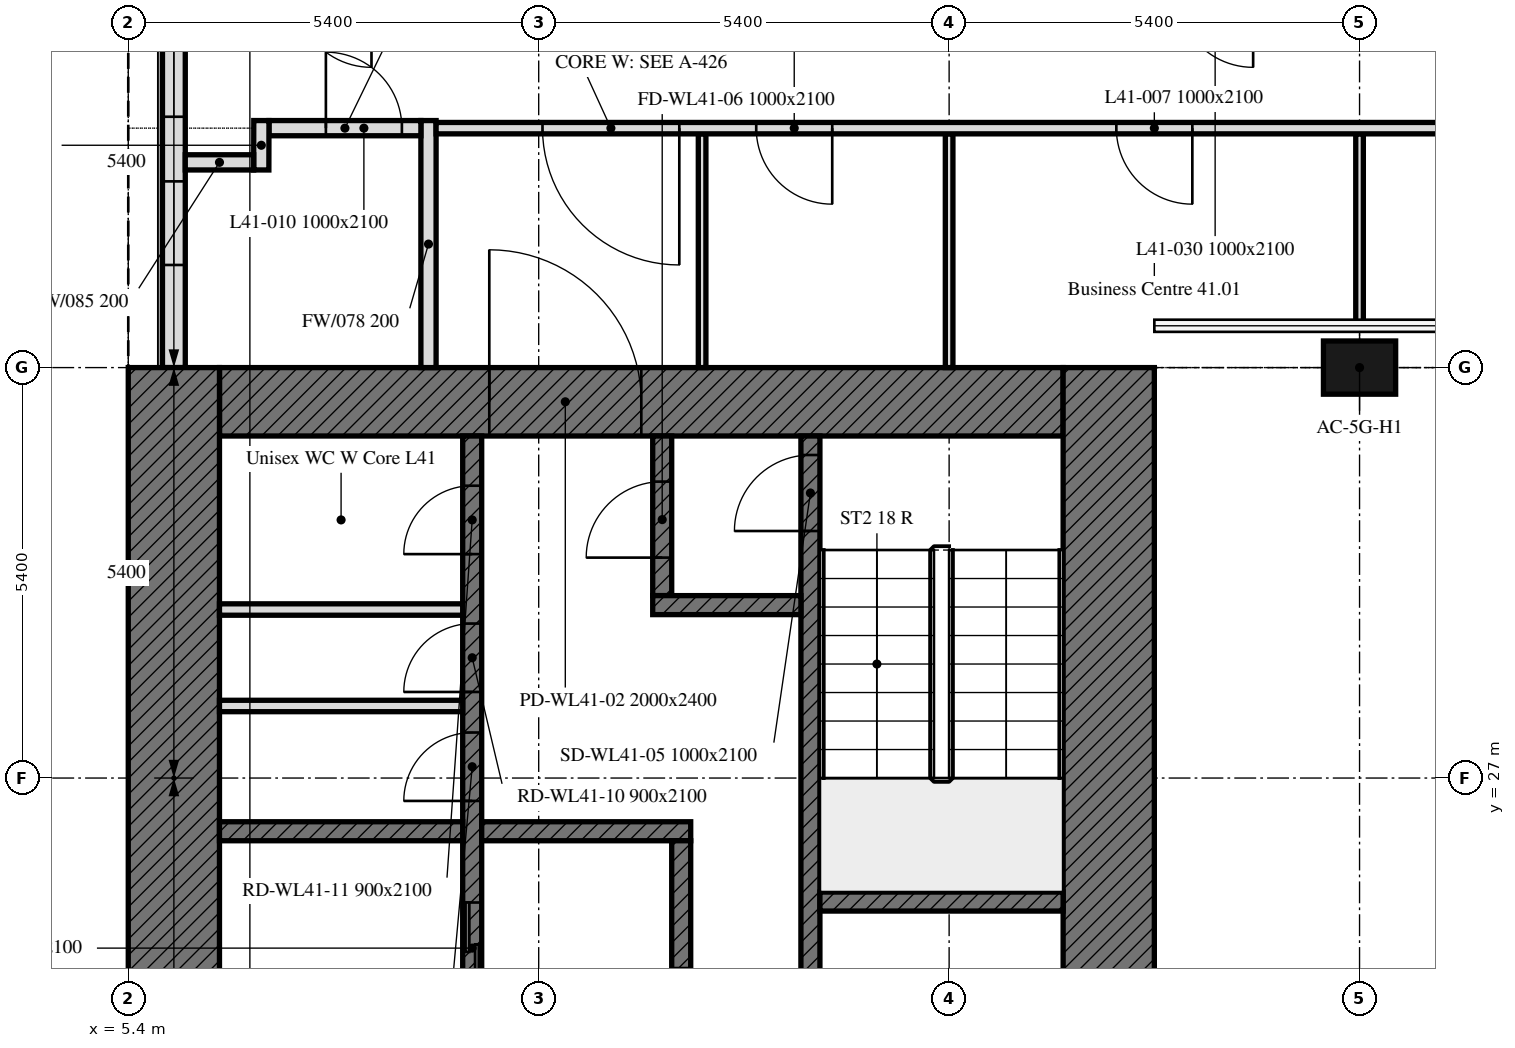
"""IFC4 building model, lengths in metres.
Left out: names, types, materials, properties, quantities, classifications, styles, units other than length and angle.
Written with IfcOpenShell. Run it as: python <this file> out.ifc"""

import sys

from ifc_helpers import new_model, si_unit, direction, frame, frame_2d, origin, origin_2d, place, context, subcontext, project, spatial, rectangle, extrude, element, fill, save


model = new_model("IFC4")
c1 = context("Model", 3, precision=1e-05, world=origin(), true_north=direction((0.0, 1.0)))
c2 = subcontext(c1, "Body", "Model", "MODEL_VIEW")
j1 = project(units=[si_unit("LENGTHUNIT", "METRE"), si_unit("PLANEANGLEUNIT", "RADIAN")], contexts=[c1])
p1 = place(None, origin())
s1 = spatial("IfcSite", under=j1, at=p1, CompositionType="ELEMENT")
p2 = place(p1, origin())
s2 = spatial("IfcBuilding", under=s1, at=p2, CompositionType="ELEMENT")
p3 = place(p2, frame((0.0, 0.0, 172.6)))
s3 = spatial("IfcBuildingStorey", under=s2, at=p3, CompositionType="ELEMENT", Elevation=172.6)
p4 = place(p3, frame((21.6, 32.4, 0.0), z_axis=(0.0, 0.0, 1.0), x_axis=(1.0, 0.0, 0.0)))
e1 = element("IfcColumn", 1, at=p4, inside=s3, PredefinedType="COLUMN", context=c2, shape_type="SweptSolid", body=[
    extrude(rectangle(XDim=0.95, YDim=0.7, at=origin_2d()), origin(), (0.0, 0.0, 1.0), 2.8),
])
p5 = place(p3, frame((6.0, 37.614, 0.0), z_axis=(0.0, 0.0, 1.0), x_axis=(0.0, -1.0, 0.0)))
e2 = element("IfcWall", 2, at=p5, inside=s3, PredefinedType="SOLIDWALL", context=c2, shape_type="SweptSolid", body=[
    extrude(rectangle(XDim=5.214, YDim=0.3, at=frame_2d((2.607, 0.0))), origin(), (0.0, 0.0, 1.0), 2.8),
])
p6 = place(p5, frame((0.814, 0.0, 0.9)))
e3 = element("IfcOpeningElement", 3, at=p6, cuts=e2, PredefinedType="OPENING", context=c2, shape_type="SweptSolid", body=[
    extrude(rectangle(XDim=1.1, YDim=1.7, at=frame_2d((0.55, 0.85))), frame((0.0, 0.16, 0.0), z_axis=(0.0, -1.0, 0.0), x_axis=(1.0, 0.0, 0.0)), (0.0, 0.0, 1.0), 0.32),
])
p7 = place(p5, frame((2.764, 0.0, 0.9)))
e4 = element("IfcOpeningElement", 4, at=p7, cuts=e2, PredefinedType="OPENING", context=c2, shape_type="SweptSolid", body=[
    extrude(rectangle(XDim=1.1, YDim=1.7, at=frame_2d((0.55, 0.85))), frame((0.0, 0.16, 0.0), z_axis=(0.0, -1.0, 0.0), x_axis=(1.0, 0.0, 0.0)), (0.0, 0.0, 1.0), 0.32),
])
p8 = place(p3, frame((6.6, 31.95, 0.0), z_axis=(0.0, 0.0, 1.0), x_axis=(1.0, 0.0, 0.0)))
e5 = element("IfcWall", 5, at=p8, inside=s3, PredefinedType="SOLIDWALL", context=c2, shape_type="SweptSolid", body=[
    extrude(rectangle(XDim=11.1, YDim=0.9, at=frame_2d((5.55, 0.0))), origin(), (0.0, 0.0, 1.0), 2.8),
])
p9 = place(p8, frame((3.55, 0.0, 0.0)))
e6 = element("IfcOpeningElement", 6, at=p9, cuts=e5, PredefinedType="OPENING", context=c2, shape_type="SweptSolid", body=[
    extrude(rectangle(XDim=2.0, YDim=2.4, at=frame_2d((1.0, 1.2))), frame((0.0, 0.45, 0.0), z_axis=(0.0, -1.0, 0.0), x_axis=(1.0, 0.0, 0.0)), (0.0, 0.0, 1.0), 0.9),
])
for number, where, z_axis, x_axis in (
    (7, (6.0, 16.2, 0.0), (0.0, 0.0, 1.0), (0.0, 1.0, 0.0)),
    (8, (18.3, 32.4, 0.0), (0.0, 0.0, 1.0), (0.0, -1.0, 0.0)),
):
    element("IfcWall", number, at=place(p3, frame(where, z_axis=z_axis, x_axis=x_axis)), inside=s3, PredefinedType="SOLIDWALL", context=c2, shape_type="SweptSolid", body=[
        extrude(rectangle(XDim=16.2, YDim=1.2, at=frame_2d((8.1, 0.0))), origin(), (0.0, 0.0, 1.0), 2.8),
    ])
p10 = place(p3, frame((9.925, 17.1, 0.0), z_axis=(0.0, 0.0, 1.0), x_axis=(0.0, 1.0, 0.0)))
e9 = element("IfcWall", 9, at=p10, inside=s3, PredefinedType="SOLIDWALL", context=c2, shape_type="SweptSolid", body=[
    extrude(rectangle(XDim=14.4, YDim=0.25, at=frame_2d((7.2, 0.0))), origin(), (0.0, 0.0, 1.0), 2.8),
])
p11 = place(p10, frame((4.6, 0.0, 0.0)))
e10 = element("IfcOpeningElement", 10, at=p11, cuts=e9, PredefinedType="OPENING", context=c2, shape_type="SweptSolid", body=[
    extrude(rectangle(XDim=1.0, YDim=2.1, at=frame_2d((0.5, 1.05))), frame((0.0, 0.125, 0.0), z_axis=(0.0, -1.0, 0.0), x_axis=(1.0, 0.0, 0.0)), (0.0, 0.0, 1.0), 0.25),
])
p12 = place(p10, frame((7.062, 0.0, 0.0)))
e11 = element("IfcOpeningElement", 11, at=p12, cuts=e9, PredefinedType="OPENING", context=c2, shape_type="SweptSolid", body=[
    extrude(rectangle(XDim=1.2, YDim=2.1, at=frame_2d((0.6, 1.05))), frame((0.0, 0.125, 0.0), z_axis=(0.0, -1.0, 0.0), x_axis=(1.0, 0.0, 0.0)), (0.0, 0.0, 1.0), 0.25),
])
p13 = place(p10, frame((9.599, 0.0, 0.0)))
e12 = element("IfcOpeningElement", 12, at=p13, cuts=e9, PredefinedType="OPENING", context=c2, shape_type="SweptSolid", body=[
    extrude(rectangle(XDim=0.9, YDim=2.1, at=frame_2d((0.45, 1.05))), frame((0.0, 0.125, 0.0), z_axis=(0.0, -1.0, 0.0), x_axis=(1.0, 0.0, 0.0)), (0.0, 0.0, 1.0), 0.25),
])
p14 = place(p10, frame((11.032, 0.0, 0.0)))
e13 = element("IfcOpeningElement", 13, at=p14, cuts=e9, PredefinedType="OPENING", context=c2, shape_type="SweptSolid", body=[
    extrude(rectangle(XDim=0.9, YDim=2.1, at=frame_2d((0.45, 1.05))), frame((0.0, 0.125, 0.0), z_axis=(0.0, -1.0, 0.0), x_axis=(1.0, 0.0, 0.0)), (0.0, 0.0, 1.0), 0.25),
])
p15 = place(p10, frame((12.846, 0.0, 0.0)))
e14 = element("IfcOpeningElement", 14, at=p15, cuts=e9, PredefinedType="OPENING", context=c2, shape_type="SweptSolid", body=[
    extrude(rectangle(XDim=0.9, YDim=2.1, at=frame_2d((0.45, 1.05))), frame((0.0, 0.125, 0.0), z_axis=(0.0, -1.0, 0.0), x_axis=(1.0, 0.0, 0.0)), (0.0, 0.0, 1.0), 0.25),
])
p16 = place(p3, frame((14.375, 17.1, 0.0), z_axis=(0.0, 0.0, 1.0), x_axis=(0.0, 1.0, 0.0)))
e15 = element("IfcWall", 15, at=p16, inside=s3, PredefinedType="SOLIDWALL", context=c2, shape_type="SweptSolid", body=[
    extrude(rectangle(XDim=14.4, YDim=0.25, at=frame_2d((7.2, 0.0))), origin(), (0.0, 0.0, 1.0), 2.8),
])
p17 = place(p16, frame((13.15, 0.0, 0.0)))
e16 = element("IfcOpeningElement", 16, at=p17, cuts=e15, PredefinedType="OPENING", context=c2, shape_type="SweptSolid", body=[
    extrude(rectangle(XDim=1.0, YDim=2.1, at=frame_2d((0.5, 1.05))), frame((0.0, 0.125, 0.0), z_axis=(0.0, -1.0, 0.0), x_axis=(1.0, 0.0, 0.0)), (0.0, 0.0, 1.0), 0.25),
])
p18 = place(p16, frame((0.6, 0.0, 0.0)))
e17 = element("IfcOpeningElement", 17, at=p18, cuts=e15, PredefinedType="OPENING", context=c2, shape_type="SweptSolid", body=[
    extrude(rectangle(XDim=1.1, YDim=2.1, at=frame_2d((0.55, 1.05))), frame((0.0, 0.125, 0.0), z_axis=(0.0, -1.0, 0.0), x_axis=(1.0, 0.0, 0.0)), (0.0, 0.0, 1.0), 0.25),
])
p19 = place(p16, frame((3.25, 0.0, 0.0)))
e18 = element("IfcOpeningElement", 18, at=p19, cuts=e15, PredefinedType="OPENING", context=c2, shape_type="SweptSolid", body=[
    extrude(rectangle(XDim=0.9, YDim=2.1, at=frame_2d((0.45, 1.05))), frame((0.0, 0.125, 0.0), z_axis=(0.0, -1.0, 0.0), x_axis=(1.0, 0.0, 0.0)), (0.0, 0.0, 1.0), 0.25),
])
for number, where, z_axis, x_axis in (
    (19, (14.5, 25.375, 0.0), (0.0, 0.0, 1.0), (1.0, 0.0, 0.0)),
    (20, (6.6, 26.3, 0.0), (0.0, 0.0, 1.0), (1.0, 0.0, 0.0)),
):
    element("IfcWall", number, at=place(p3, frame(where, z_axis=z_axis, x_axis=x_axis)), inside=s3, PredefinedType="SOLIDWALL", context=c2, shape_type="SweptSolid", body=[
        extrude(rectangle(XDim=3.2, YDim=0.25, at=frame_2d((1.6, 0.0))), origin(), (0.0, 0.0, 1.0), 2.8),
    ])
p20 = place(p3, frame((10.05, 26.3, 0.0), z_axis=(0.0, 0.0, 1.0), x_axis=(1.0, 0.0, 0.0)))
e21 = element("IfcWall", 21, at=p20, inside=s3, PredefinedType="SOLIDWALL", context=c2, shape_type="SweptSolid", body=[
    extrude(rectangle(XDim=2.75, YDim=0.25, at=frame_2d((1.375, 0.0))), origin(), (0.0, 0.0, 1.0), 2.8),
])
p21 = place(p3, frame((12.425, 29.4, 0.0), z_axis=(0.0, 0.0, 1.0), x_axis=(0.0, 1.0, 0.0)))
e22 = element("IfcWall", 22, at=p21, inside=s3, PredefinedType="SOLIDWALL", context=c2, shape_type="SweptSolid", body=[
    extrude(rectangle(XDim=2.1, YDim=0.25, at=frame_2d((1.05, 0.0))), origin(), (0.0, 0.0, 1.0), 2.8),
])
p22 = place(p21, frame((0.5, 0.0, 0.0)))
e23 = element("IfcOpeningElement", 23, at=p22, cuts=e22, PredefinedType="OPENING", context=c2, shape_type="SweptSolid", body=[
    extrude(rectangle(XDim=1.0, YDim=2.1, at=frame_2d((0.5, 1.05))), frame((0.0, 0.125, 0.0), z_axis=(0.0, -1.0, 0.0), x_axis=(1.0, 0.0, 0.0)), (0.0, 0.0, 1.0), 0.25),
])
p23 = place(p3, frame((12.3, 29.275, 0.0), z_axis=(0.0, 0.0, 1.0), x_axis=(1.0, 0.0, 0.0)))
e24 = element("IfcWall", 24, at=p23, inside=s3, PredefinedType="SOLIDWALL", context=c2, shape_type="SweptSolid", body=[
    extrude(rectangle(XDim=1.95, YDim=0.25, at=frame_2d((0.975, 0.0))), origin(), (0.0, 0.0, 1.0), 2.8),
])
p24 = place(p3, frame((12.675, 20.55, 0.0), z_axis=(0.0, 0.0, 1.0), x_axis=(0.0, 1.0, 0.0)))
e25 = element("IfcWall", 25, at=p24, inside=s3, PredefinedType="SOLIDWALL", context=c2, shape_type="SweptSolid", body=[
    extrude(rectangle(XDim=5.625, YDim=0.25, at=frame_2d((2.812, 0.0))), origin(), (0.0, 0.0, 1.0), 2.8),
])
p25 = place(p24, frame((2.95, 0.0, 0.0)))
e26 = element("IfcOpeningElement", 26, at=p25, cuts=e25, PredefinedType="OPENING", context=c2, shape_type="SweptSolid", body=[
    extrude(rectangle(XDim=1.0, YDim=2.1, at=frame_2d((0.5, 1.05))), frame((0.0, 0.125, 0.0), z_axis=(0.0, -1.0, 0.0), x_axis=(1.0, 0.0, 0.0)), (0.0, 0.0, 1.0), 0.25),
])
for number, where, z_axis, x_axis in (
    (27, (6.6, 27.948, 0.0), (0.0, 0.0, 1.0), (1.0, 0.0, 0.0)),
    (28, (6.6, 29.217, 0.0), (0.0, 0.0, 1.0), (1.0, 0.0, 0.0)),
):
    element("IfcWall", number, at=place(p3, frame(where, z_axis=z_axis, x_axis=x_axis)), inside=s3, PredefinedType="PARTITIONING", context=c2, shape_type="SweptSolid", body=[
        extrude(rectangle(XDim=3.2, YDim=0.15, at=frame_2d((1.6, 0.0))), origin(), (0.0, 0.0, 1.0), 2.8),
    ])
p26 = place(p3, frame((16.2, 35.475, 0.0), z_axis=(0.0, 0.0, 1.0), x_axis=(0.0, -1.0, 0.0)))
e29 = element("IfcWall", 29, at=p26, inside=s3, PredefinedType="PARTITIONING", context=c2, shape_type="SweptSolid", body=[
    extrude(rectangle(XDim=3.075, YDim=0.1, at=frame_2d((1.538, 0.0))), origin(), (0.0, 0.0, 1.0), 2.8),
])
p27 = place(p3, frame((21.6, 32.895, 0.0), z_axis=(0.0, 0.0, 1.0), x_axis=(0.0, 1.0, 0.0)))
e30 = element("IfcWall", 30, at=p27, inside=s3, PredefinedType="PARTITIONING", context=c2, shape_type="SweptSolid", body=[
    extrude(rectangle(XDim=2.58, YDim=0.1, at=frame_2d((1.29, 0.0))), origin(), (0.0, 0.0, 1.0), 2.8),
])
p28 = place(p3, frame((9.35, 35.65, 0.0), z_axis=(0.0, 0.0, 1.0), x_axis=(0.0, -1.0, 0.0)))
e31 = element("IfcWall", 31, at=p28, inside=s3, PredefinedType="PARTITIONING", context=c2, shape_type="SweptSolid", body=[
    extrude(rectangle(XDim=3.25, YDim=0.2, at=frame_2d((1.625, 0.0))), origin(), (0.0, 0.0, 1.0), 2.8),
])
p29 = place(p3, frame((12.95, 32.4, 0.0), z_axis=(0.0, 0.0, 1.0), x_axis=(0.0, 1.0, 0.0)))
e32 = element("IfcWall", 32, at=p29, inside=s3, PredefinedType="PARTITIONING", context=c2, shape_type="SweptSolid", body=[
    extrude(rectangle(XDim=3.075, YDim=0.1, at=frame_2d((1.538, 0.0))), origin(), (0.0, 0.0, 1.0), 2.8),
])
p30 = place(p3, frame((7.251, 35.55, 0.0), z_axis=(0.0, 0.0, 1.0), x_axis=(1.0, 0.0, 0.0)))
e33 = element("IfcWall", 33, at=p30, inside=s3, PredefinedType="PARTITIONING", context=c2, shape_type="SweptSolid", body=[
    extrude(rectangle(XDim=1.999, YDim=0.2, at=frame_2d((1.0, 0.0))), origin(), (0.0, 0.0, 1.0), 2.8),
])
p31 = place(p30, frame((0.749, 0.0, 0.0)))
e34 = element("IfcOpeningElement", 34, at=p31, cuts=e33, PredefinedType="OPENING", context=c2, shape_type="SweptSolid", body=[
    extrude(rectangle(XDim=1.0, YDim=2.1, at=frame_2d((0.5, 1.05))), frame((0.0, 0.1, 0.0), z_axis=(0.0, -1.0, 0.0), x_axis=(1.0, 0.0, 0.0)), (0.0, 0.0, 1.0), 0.2),
])
p32 = place(p3, frame((7.151, 35.65, 0.0), z_axis=(0.0, 0.0, 1.0), x_axis=(-0.001878283689, -0.999998236024, 0.0)))
e35 = element("IfcWall", 35, at=p32, inside=s3, PredefinedType="PARTITIONING", context=c2, shape_type="SweptSolid", body=[
    extrude(rectangle(XDim=0.65, YDim=0.2, at=frame_2d((0.325, 0.0))), origin(), (0.0, 0.0, 1.0), 2.8),
])
p33 = place(p3, frame((7.05, 35.1, 0.0), z_axis=(0.0, 0.0, 1.0), x_axis=(-1.0, 0.0, 0.0)))
e36 = element("IfcWall", 36, at=p33, inside=s3, PredefinedType="PARTITIONING", context=c2, shape_type="SweptSolid", body=[
    extrude(rectangle(XDim=0.9, YDim=0.2, at=frame_2d((0.45, 0.0))), origin(), (0.0, 0.0, 1.0), 2.8),
])
p34 = place(p3, frame((43.275, 35.55, 0.0), z_axis=(0.0, 0.0, 1.0), x_axis=(-1.0, 0.0, 0.0)))
e37 = element("IfcWall", 37, at=p34, inside=s3, PredefinedType="PARTITIONING", context=c2, shape_type="SweptSolid", body=[
    extrude(rectangle(XDim=33.825, YDim=0.15, at=frame_2d((16.913, 0.0))), origin(), (0.0, 0.0, 1.0), 2.8),
])
p35 = place(p34, frame((23.875, 0.0, 0.0)))
e38 = element("IfcOpeningElement", 38, at=p35, cuts=e37, PredefinedType="OPENING", context=c2, shape_type="SweptSolid", body=[
    extrude(rectangle(XDim=1.0, YDim=2.1, at=frame_2d((0.5, 1.05))), frame((0.0, 0.075, 0.0), z_axis=(0.0, -1.0, 0.0), x_axis=(1.0, 0.0, 0.0)), (0.0, 0.0, 1.0), 0.15),
])
p36 = place(p34, frame((13.475, 0.0, 0.0)))
e39 = element("IfcOpeningElement", 39, at=p36, cuts=e37, PredefinedType="OPENING", context=c2, shape_type="SweptSolid", body=[
    extrude(rectangle(XDim=1.0, YDim=2.1, at=frame_2d((0.5, 1.05))), frame((0.0, 0.075, 0.0), z_axis=(0.0, -1.0, 0.0), x_axis=(1.0, 0.0, 0.0)), (0.0, 0.0, 1.0), 0.15),
])
p37 = place(p34, frame((8.337, 0.0, 0.0)))
e40 = element("IfcOpeningElement", 40, at=p37, cuts=e37, PredefinedType="OPENING", context=c2, shape_type="SweptSolid", body=[
    extrude(rectangle(XDim=1.0, YDim=2.1, at=frame_2d((0.5, 1.05))), frame((0.0, 0.075, 0.0), z_axis=(0.0, -1.0, 0.0), x_axis=(1.0, 0.0, 0.0)), (0.0, 0.0, 1.0), 0.15),
])
p38 = place(p34, frame((1.648, 0.0, 0.0)))
e41 = element("IfcOpeningElement", 41, at=p38, cuts=e37, PredefinedType="OPENING", context=c2, shape_type="SweptSolid", body=[
    extrude(rectangle(XDim=1.0, YDim=2.1, at=frame_2d((0.5, 1.05))), frame((0.0, 0.075, 0.0), z_axis=(0.0, -1.0, 0.0), x_axis=(1.0, 0.0, 0.0)), (0.0, 0.0, 1.0), 0.15),
])
p39 = place(p34, frame((28.613, 0.0, 0.0)))
e42 = element("IfcOpeningElement", 42, at=p39, cuts=e37, PredefinedType="OPENING", context=c2, shape_type="SweptSolid", body=[
    extrude(rectangle(XDim=1.0, YDim=2.1, at=frame_2d((0.5, 1.05))), frame((0.0, 0.075, 0.0), z_axis=(0.0, -1.0, 0.0), x_axis=(1.0, 0.0, 0.0)), (0.0, 0.0, 1.0), 0.15),
])
p40 = place(p34, frame((30.625, 0.0, 0.0)))
e43 = element("IfcOpeningElement", 43, at=p40, cuts=e37, PredefinedType="OPENING", context=c2, shape_type="SweptSolid", body=[
    extrude(rectangle(XDim=1.8, YDim=2.4, at=frame_2d((0.9, 1.2))), frame((0.0, 0.075, 0.0), z_axis=(0.0, -1.0, 0.0), x_axis=(1.0, 0.0, 0.0)), (0.0, 0.0, 1.0), 0.15),
])
p41 = place(p34, frame((5.525, 0.0, 0.0)))
e44 = element("IfcOpeningElement", 44, at=p41, cuts=e37, PredefinedType="OPENING", context=c2, shape_type="SweptSolid", body=[
    extrude(rectangle(XDim=1.8, YDim=2.4, at=frame_2d((0.9, 1.2))), frame((0.0, 0.075, 0.0), z_axis=(0.0, -1.0, 0.0), x_axis=(1.0, 0.0, 0.0)), (0.0, 0.0, 1.0), 0.15),
])
p42 = place(p6, origin())
e45 = element("IfcWindow", 45, at=p42, inside=s3, PartitioningType="SINGLE_PANEL", PredefinedType="WINDOW", context=c2, shape_type="SweptSolid", body=[
    extrude(rectangle(XDim=1.1, YDim=1.7, at=frame_2d((0.55, 0.85))), frame((0.0, 0.03, 0.0), z_axis=(0.0, -1.0, 0.0), x_axis=(1.0, 0.0, 0.0)), (0.0, 0.0, 1.0), 0.06),
])
fill(e3, e45)
p43 = place(p7, origin())
e46 = element("IfcWindow", 46, at=p43, inside=s3, PartitioningType="SINGLE_PANEL", PredefinedType="WINDOW", context=c2, shape_type="SweptSolid", body=[
    extrude(rectangle(XDim=1.1, YDim=1.7, at=frame_2d((0.55, 0.85))), frame((0.0, 0.03, 0.0), z_axis=(0.0, -1.0, 0.0), x_axis=(1.0, 0.0, 0.0)), (0.0, 0.0, 1.0), 0.06),
])
fill(e4, e46)
p44 = place(p9, origin())
e47 = element("IfcDoor", 47, at=p44, inside=s3, OperationType="DOUBLE_DOOR_SINGLE_SWING", PredefinedType="DOOR", context=c2, shape_type="SweptSolid", body=[
    extrude(rectangle(XDim=2.0, YDim=2.4, at=frame_2d((1.0, 1.2))), frame((0.0, 0.025, 0.0), z_axis=(0.0, -1.0, 0.0), x_axis=(1.0, 0.0, 0.0)), (0.0, 0.0, 1.0), 0.05),
])
fill(e6, e47)
p45 = place(p17, origin())
e48 = element("IfcDoor", 48, at=p45, inside=s3, OperationType="SINGLE_SWING_LEFT", PredefinedType="DOOR", context=c2, shape_type="SweptSolid", body=[
    extrude(rectangle(XDim=1.0, YDim=2.1, at=frame_2d((0.5, 1.05))), frame((0.0, 0.025, 0.0), z_axis=(0.0, -1.0, 0.0), x_axis=(1.0, 0.0, 0.0)), (0.0, 0.0, 1.0), 0.05),
])
fill(e16, e48)
p46 = place(p22, origin())
e49 = element("IfcDoor", 49, at=p46, inside=s3, OperationType="SINGLE_SWING_LEFT", PredefinedType="DOOR", context=c2, shape_type="SweptSolid", body=[
    extrude(rectangle(XDim=1.0, YDim=2.1, at=frame_2d((0.5, 1.05))), frame((0.0, 0.025, 0.0), z_axis=(0.0, -1.0, 0.0), x_axis=(1.0, 0.0, 0.0)), (0.0, 0.0, 1.0), 0.05),
])
fill(e23, e49)
p47 = place(p12, origin())
e50 = element("IfcDoor", 50, at=p47, inside=s3, OperationType="DOUBLE_DOOR_SLIDING", PredefinedType="DOOR", context=c2, shape_type="SweptSolid", body=[
    extrude(rectangle(XDim=1.2, YDim=2.1, at=frame_2d((0.6, 1.05))), frame((0.0, 0.025, 0.0), z_axis=(0.0, -1.0, 0.0), x_axis=(1.0, 0.0, 0.0)), (0.0, 0.0, 1.0), 0.05),
])
fill(e11, e50)
p48 = place(p13, origin())
e51 = element("IfcDoor", 51, at=p48, inside=s3, OperationType="SINGLE_SWING_LEFT", PredefinedType="DOOR", context=c2, shape_type="SweptSolid", body=[
    extrude(rectangle(XDim=0.9, YDim=2.1, at=frame_2d((0.45, 1.05))), frame((0.0, 0.025, 0.0), z_axis=(0.0, -1.0, 0.0), x_axis=(1.0, 0.0, 0.0)), (0.0, 0.0, 1.0), 0.05),
])
fill(e12, e51)
p49 = place(p14, origin())
e52 = element("IfcDoor", 52, at=p49, inside=s3, OperationType="SINGLE_SWING_LEFT", PredefinedType="DOOR", context=c2, shape_type="SweptSolid", body=[
    extrude(rectangle(XDim=0.9, YDim=2.1, at=frame_2d((0.45, 1.05))), frame((0.0, 0.025, 0.0), z_axis=(0.0, -1.0, 0.0), x_axis=(1.0, 0.0, 0.0)), (0.0, 0.0, 1.0), 0.05),
])
fill(e13, e52)
p50 = place(p15, origin())
e53 = element("IfcDoor", 53, at=p50, inside=s3, OperationType="SINGLE_SWING_LEFT", PredefinedType="DOOR", context=c2, shape_type="SweptSolid", body=[
    extrude(rectangle(XDim=0.9, YDim=2.1, at=frame_2d((0.45, 1.05))), frame((0.0, 0.025, 0.0), z_axis=(0.0, -1.0, 0.0), x_axis=(1.0, 0.0, 0.0)), (0.0, 0.0, 1.0), 0.05),
])
fill(e14, e53)
p51 = place(p35, origin())
e54 = element("IfcDoor", 54, at=p51, inside=s3, OperationType="SINGLE_SWING_RIGHT", PredefinedType="DOOR", context=c2, shape_type="SweptSolid", body=[
    extrude(rectangle(XDim=1.0, YDim=2.1, at=frame_2d((0.5, 1.05))), frame((0.0, 0.025, 0.0), z_axis=(0.0, -1.0, 0.0), x_axis=(1.0, 0.0, 0.0)), (0.0, 0.0, 1.0), 0.05),
])
fill(e38, e54)
p52 = place(p31, origin())
e55 = element("IfcDoor", 55, at=p52, inside=s3, OperationType="SINGLE_SWING_LEFT", PredefinedType="DOOR", context=c2, shape_type="SweptSolid", body=[
    extrude(rectangle(XDim=1.0, YDim=2.1, at=frame_2d((0.5, 1.05))), frame((0.0, 0.025, 0.0), z_axis=(0.0, -1.0, 0.0), x_axis=(1.0, 0.0, 0.0)), (0.0, 0.0, 1.0), 0.05),
])
fill(e34, e55)
p53 = place(p39, origin())
e56 = element("IfcDoor", 56, at=p53, inside=s3, OperationType="SINGLE_SWING_RIGHT", PredefinedType="DOOR", context=c2, shape_type="SweptSolid", body=[
    extrude(rectangle(XDim=1.0, YDim=2.1, at=frame_2d((0.5, 1.05))), frame((0.0, 0.025, 0.0), z_axis=(0.0, -1.0, 0.0), x_axis=(1.0, 0.0, 0.0)), (0.0, 0.0, 1.0), 0.05),
])
fill(e42, e56)
p54 = place(p40, origin())
e57 = element("IfcDoor", 57, at=p54, inside=s3, OperationType="DOUBLE_DOOR_SINGLE_SWING", PredefinedType="DOOR", context=c2, shape_type="SweptSolid", body=[
    extrude(rectangle(XDim=1.8, YDim=2.4, at=frame_2d((0.9, 1.2))), frame((0.0, 0.025, 0.0), z_axis=(0.0, -1.0, 0.0), x_axis=(1.0, 0.0, 0.0)), (0.0, 0.0, 1.0), 0.05),
])
fill(e43, e57)
save(model, sys.argv[1])
